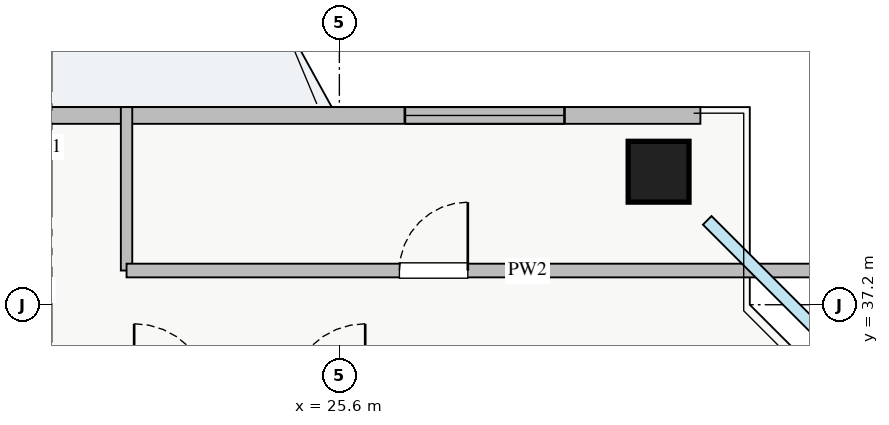
"""IFC4 building model, lengths in metres.
Left out: names, types, materials, properties, quantities, classifications, styles, units other than length and angle.
Written with IfcOpenShell. Run it as: python <this file> out.ifc"""

import sys

from ifc_helpers import new_model, si_unit, direction, frame, frame_2d, origin, origin_2d, place, context, subcontext, project, spatial, rectangle, extrude, source, transform, mapped, element, fill, save


model = new_model("IFC4")
c1 = context("Model", 3, precision=1e-05, world=origin(), true_north=direction((0.0, 1.0)))
c2 = subcontext(c1, "Body", "Model", "MODEL_VIEW")
j1 = project(units=[si_unit("LENGTHUNIT", "METRE"), si_unit("PLANEANGLEUNIT", "RADIAN")], contexts=[c1])
p1 = place(None, origin())
s1 = spatial("IfcSite", under=j1, at=p1, CompositionType="ELEMENT")
p2 = place(p1, origin())
s2 = spatial("IfcBuilding", under=s1, at=p2, CompositionType="ELEMENT")
p3 = place(p2, frame((0.0, 0.0, 190.5)))
s3 = spatial("IfcBuildingStorey", under=s2, at=p3, CompositionType="ELEMENT", Elevation=190.5)
m1 = source(origin(), c2, "Body", "SweptSolid", [
    extrude(rectangle(XDim=0.8, YDim=0.8, at=origin_2d()), origin(), (0.0, 0.0, 1.0), 3.25),
])
p4 = place(p3, frame((29.8, 38.95, 0.0), z_axis=(0.0, 0.0, 1.0), x_axis=(1.0, 0.0, 0.0)))
e1 = element("IfcColumn", 1, at=p4, inside=s3, PredefinedType="COLUMN", context=c2, shape_type="MappedRepresentation", body=[
    mapped(m1, transform((0.0, 0.0, 0.0), x_axis=(1.0, 0.0, 0.0), y_axis=(0.0, 1.0, 0.0), z_axis=(0.0, 0.0, 1.0), scale=1.0)),
])
p5 = place(p3, frame((7.65, 39.69, 0.0), z_axis=(0.0, 0.0, 1.0), x_axis=(1.0, 0.0, 0.0)))
e2 = element("IfcWall", 2, at=p5, inside=s3, PredefinedType="STANDARD", context=c2, shape_type="SweptSolid", body=[
    extrude(rectangle(XDim=22.7, YDim=0.22, at=frame_2d((11.35, 0.0))), origin(), (0.0, 0.0, 1.0), 2.61),
])
p6 = place(p5, frame((12.2, 0.0, 0.0)))
e3 = element("IfcOpeningElement", 3, at=p6, cuts=e2, PredefinedType="OPENING", context=c2, shape_type="SweptSolid", body=[
    extrude(rectangle(XDim=1.2, YDim=2.1, at=frame_2d((0.6, 1.05))), frame((0.0, 0.12, 0.0), z_axis=(0.0, -1.0, 0.0), x_axis=(1.0, 0.0, 0.0)), (0.0, 0.0, 1.0), 0.24),
])
p7 = place(p5, frame((1.637, 0.0, 0.9)))
e4 = element("IfcOpeningElement", 4, at=p7, cuts=e2, PredefinedType="OPENING", context=c2, shape_type="SweptSolid", body=[
    extrude(rectangle(XDim=2.4, YDim=1.48, at=frame_2d((1.2, 0.74))), frame((0.0, 0.12, 0.0), z_axis=(0.0, -1.0, 0.0), x_axis=(1.0, 0.0, 0.0)), (0.0, 0.0, 1.0), 0.24),
])
p8 = place(p5, frame((7.612, 0.0, 0.9)))
e5 = element("IfcOpeningElement", 5, at=p8, cuts=e2, PredefinedType="OPENING", context=c2, shape_type="SweptSolid", body=[
    extrude(rectangle(XDim=1.8, YDim=1.45, at=frame_2d((0.9, 0.725))), frame((0.0, 0.12, 0.0), z_axis=(0.0, -1.0, 0.0), x_axis=(1.0, 0.0, 0.0)), (0.0, 0.0, 1.0), 0.24),
])
p9 = place(p5, frame((18.812, 0.0, 0.9)))
e6 = element("IfcOpeningElement", 6, at=p9, cuts=e2, PredefinedType="OPENING", context=c2, shape_type="SweptSolid", body=[
    extrude(rectangle(XDim=2.1, YDim=1.48, at=frame_2d((1.05, 0.74))), frame((0.0, 0.12, 0.0), z_axis=(0.0, -1.0, 0.0), x_axis=(1.0, 0.0, 0.0)), (0.0, 0.0, 1.0), 0.24),
])
p10 = place(p3, frame((22.8, 37.65, 0.0), z_axis=(0.0, 0.0, 1.0), x_axis=(0.0, 1.0, 0.0)))
e7 = element("IfcWall", 7, at=p10, inside=s3, PredefinedType="PARTITIONING", context=c2, shape_type="SweptSolid", body=[
    extrude(rectangle(XDim=2.15, YDim=0.15, at=frame_2d((1.075, 0.0))), origin(), (0.0, 0.0, 1.0), 3.07),
])
p11 = place(p3, frame((22.8, 37.65, 0.0), z_axis=(0.0, 0.0, 1.0), x_axis=(1.0, 0.0, 0.0)))
e8 = element("IfcWall", 8, at=p11, inside=s3, PredefinedType="PARTITIONING", context=c2, shape_type="SweptSolid", body=[
    extrude(rectangle(XDim=9.65, YDim=0.18, at=frame_2d((4.825, 0.0))), origin(), (0.0, 0.0, 1.0), 3.07),
])
p12 = place(p11, frame((3.59, 0.0, 0.0)))
e9 = element("IfcOpeningElement", 9, at=p12, cuts=e8, PredefinedType="OPENING", context=c2, shape_type="SweptSolid", body=[
    extrude(rectangle(XDim=0.9, YDim=2.05, at=frame_2d((0.45, 1.025))), frame((0.0, 0.1, 0.0), z_axis=(0.0, -1.0, 0.0), x_axis=(1.0, 0.0, 0.0)), (0.0, 0.0, 1.0), 0.2),
])
m2 = source(origin(), c2, "Body", "SweptSolid", [
    extrude(rectangle(XDim=2.1, YDim=1.48, at=frame_2d((1.05, 0.74))), frame((0.0, 0.03, 0.0), z_axis=(0.0, -1.0, 0.0), x_axis=(1.0, 0.0, 0.0)), (0.0, 0.0, 1.0), 0.06),
])
p13 = place(p9, origin())
e10 = element("IfcWindow", 10, at=p13, inside=s3, PartitioningType="TRIPLE_PANEL_VERTICAL", PredefinedType="WINDOW", context=c2, shape_type="MappedRepresentation", body=[
    mapped(m2, transform((0.0, 0.0, 0.0), x_axis=(1.0, 0.0, 0.0), y_axis=(0.0, 1.0, 0.0), z_axis=(0.0, 0.0, 1.0), scale=1.0)),
])
fill(e6, e10)
m3 = source(origin(), c2, "Body", "SweptSolid", [
    extrude(rectangle(XDim=0.9, YDim=2.05, at=frame_2d((0.45, 1.025))), frame((0.0, 0.025, 0.0), z_axis=(0.0, -1.0, 0.0), x_axis=(1.0, 0.0, 0.0)), (0.0, 0.0, 1.0), 0.05),
])
p14 = place(p12, origin())
e11 = element("IfcDoor", 11, at=p14, inside=s3, OperationType="SINGLE_SWING_RIGHT", PredefinedType="DOOR", context=c2, shape_type="MappedRepresentation", body=[
    mapped(m3, transform((0.0, 0.0, 0.0), x_axis=(1.0, 0.0, 0.0), y_axis=(0.0, 1.0, 0.0), z_axis=(0.0, 0.0, 1.0), scale=1.0)),
])
fill(e9, e11)
save(model, sys.argv[1])
